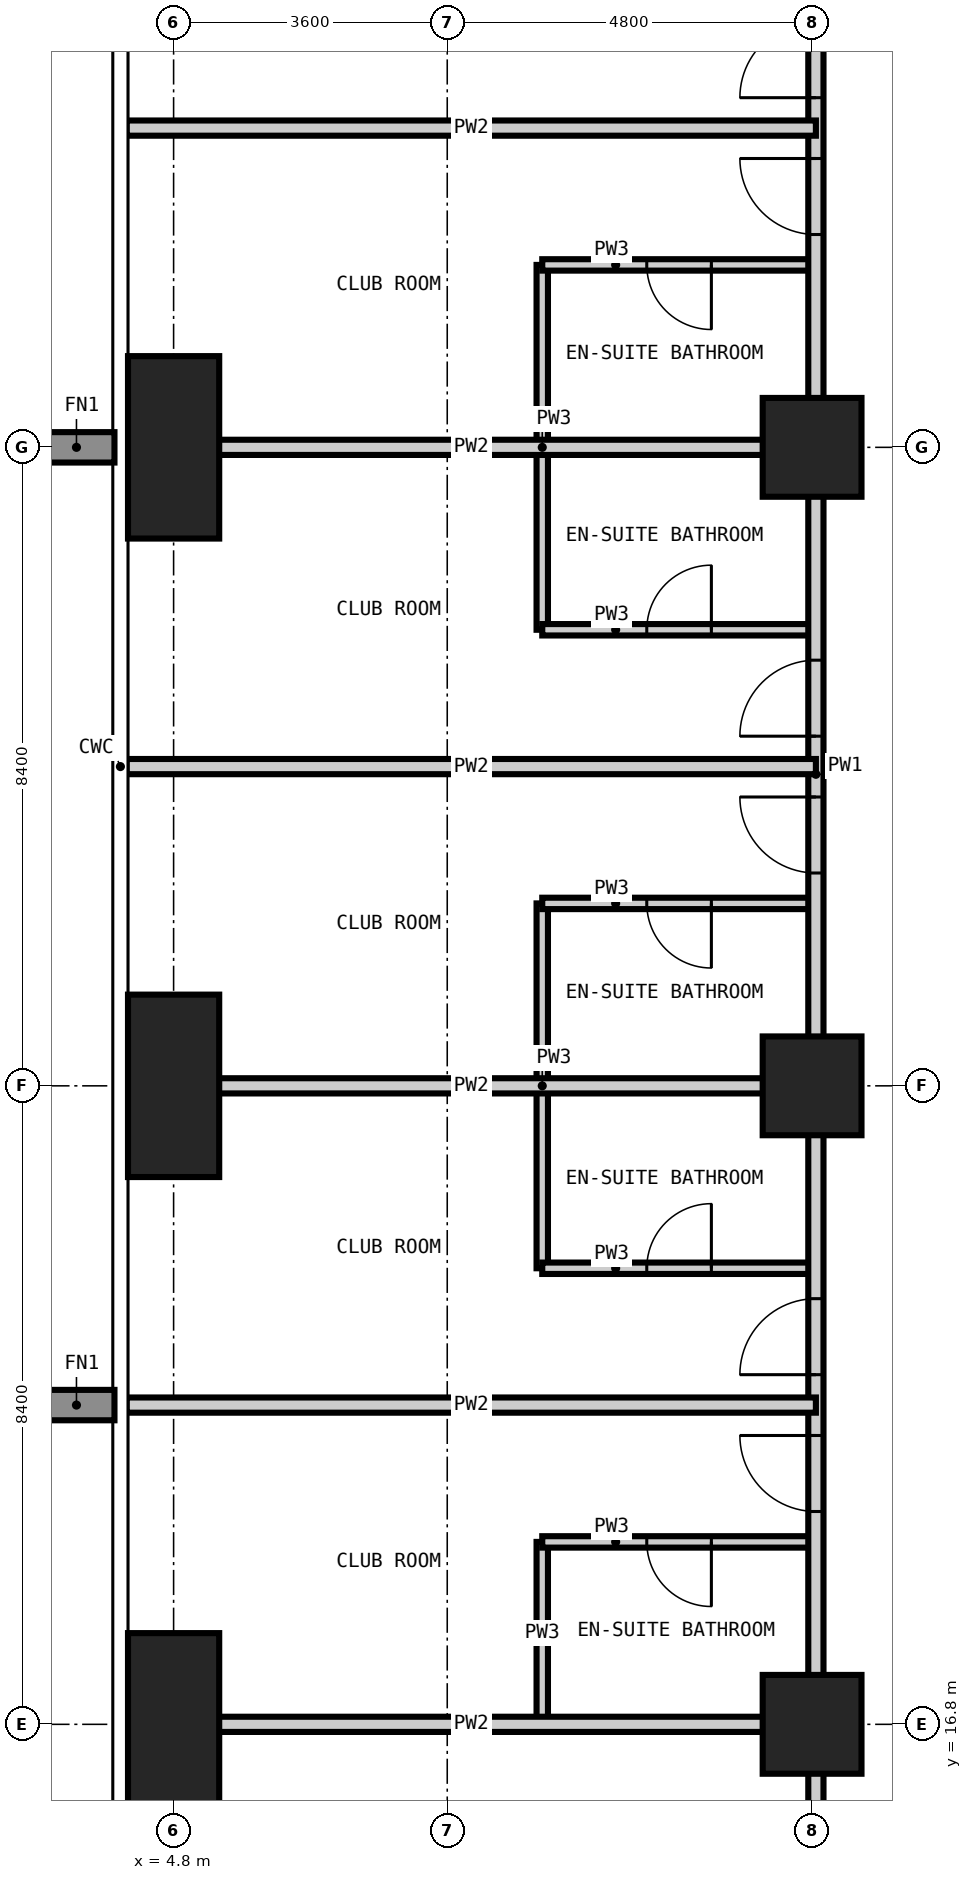
"""IFC4 building model, lengths in metres.
Left out: names, types, materials, properties, quantities, classifications, styles, units other than length and angle.
Written with IfcOpenShell. Run it as: python <this file> out.ifc"""

import sys

from ifc_helpers import new_model, si_unit, direction, frame, frame_2d, origin, origin_2d, place, context, subcontext, project, spatial, rectangle, extrude, element, fill, save


model = new_model("IFC4")
c1 = context("Model", 3, precision=1e-05, world=origin(), true_north=direction((0.0, 1.0)))
c2 = subcontext(c1, "Body", "Model", "MODEL_VIEW")
j1 = project(units=[si_unit("LENGTHUNIT", "METRE"), si_unit("PLANEANGLEUNIT", "RADIAN")], contexts=[c1])
p1 = place(None, origin())
s1 = spatial("IfcSite", under=j1, at=p1, CompositionType="ELEMENT")
p2 = place(p1, origin())
s2 = spatial("IfcBuilding", under=s1, at=p2, CompositionType="ELEMENT")
p3 = place(p2, frame((0.0, 0.0, 166.2)))
s3 = spatial("IfcBuildingStorey", under=s2, at=p3, CompositionType="ELEMENT", Elevation=166.2)
for number, where, z_axis, x_axis in (
    (1, (4.8, 16.8, -0.35), (0.0, 0.0, 1.0), (1.0, 0.0, 0.0)),
    (2, (4.8, 25.2, -0.35), (0.0, 0.0, 1.0), (1.0, 0.0, 0.0)),
    (3, (4.8, 33.6, -0.35), (0.0, 0.0, 1.0), (1.0, 0.0, 0.0)),
):
    element("IfcColumn", number, at=place(p3, frame(where, z_axis=z_axis, x_axis=x_axis)), inside=s3, PredefinedType="COLUMN", context=c2, shape_type="SweptSolid", body=[
        extrude(rectangle(XDim=1.2, YDim=2.4, at=origin_2d()), origin(), (0.0, 0.0, 1.0), 3.6),
    ])
for number, where, z_axis, x_axis in (
    (4, (13.2, 16.8, -0.35), (0.0, 0.0, 1.0), (1.0, 0.0, 0.0)),
    (5, (13.2, 25.2, -0.35), (0.0, 0.0, 1.0), (1.0, 0.0, 0.0)),
    (6, (13.2, 33.6, -0.35), (0.0, 0.0, 1.0), (1.0, 0.0, 0.0)),
):
    element("IfcColumn", number, at=place(p3, frame(where, z_axis=z_axis, x_axis=x_axis)), inside=s3, PredefinedType="COLUMN", context=c2, shape_type="SweptSolid", body=[
        extrude(rectangle(XDim=1.3, YDim=1.3, at=origin_2d()), origin(), (0.0, 0.0, 1.0), 3.6),
    ])
p4 = place(p3, frame((9.65, 16.8, 0.0), z_axis=(0.0, 0.0, 1.0), x_axis=(0.0, 1.0, 0.0)))
e7 = element("IfcWall", 7, at=p4, inside=s3, PredefinedType="PARTITIONING", context=c2, shape_type="SweptSolid", body=[
    extrude(rectangle(XDim=2.4, YDim=0.15, at=frame_2d((1.2, 0.0))), origin(), (0.0, 0.0, 1.0), 3.25),
])
for number, where, z_axis, x_axis in (
    (8, (9.65, 22.8, 0.0), (0.0, 0.0, 1.0), (0.0, 1.0, 0.0)),
    (9, (9.65, 31.2, 0.0), (0.0, 0.0, 1.0), (0.0, 1.0, 0.0)),
):
    element("IfcWall", number, at=place(p3, frame(where, z_axis=z_axis, x_axis=x_axis)), inside=s3, PredefinedType="PARTITIONING", context=c2, shape_type="SweptSolid", body=[
        extrude(rectangle(XDim=4.8, YDim=0.15, at=frame_2d((2.4, 0.0))), origin(), (0.0, 0.0, 1.0), 3.25),
    ])
p5 = place(p3, frame((9.65, 19.2, 0.0), z_axis=(0.0, 0.0, 1.0), x_axis=(1.0, 0.0, 0.0)))
e10 = element("IfcWall", 10, at=p5, inside=s3, PredefinedType="PARTITIONING", context=c2, shape_type="SweptSolid", body=[
    extrude(rectangle(XDim=3.6, YDim=0.15, at=frame_2d((1.8, 0.0))), origin(), (0.0, 0.0, 1.0), 3.25),
])
p6 = place(p5, frame((1.375, 0.0, 0.0)))
e11 = element("IfcOpeningElement", 11, at=p6, cuts=e10, PredefinedType="OPENING", context=c2, shape_type="SweptSolid", body=[
    extrude(rectangle(XDim=0.85, YDim=2.1, at=frame_2d((0.425, 1.05))), frame((0.0, 0.085, 0.0), z_axis=(0.0, -1.0, 0.0), x_axis=(1.0, 0.0, 0.0)), (0.0, 0.0, 1.0), 0.17),
])
p7 = place(p3, frame((9.65, 22.8, 0.0), z_axis=(0.0, 0.0, 1.0), x_axis=(1.0, 0.0, 0.0)))
e12 = element("IfcWall", 12, at=p7, inside=s3, PredefinedType="PARTITIONING", context=c2, shape_type="SweptSolid", body=[
    extrude(rectangle(XDim=3.6, YDim=0.15, at=frame_2d((1.8, 0.0))), origin(), (0.0, 0.0, 1.0), 3.25),
])
p8 = place(p7, frame((1.375, 0.0, 0.0)))
e13 = element("IfcOpeningElement", 13, at=p8, cuts=e12, PredefinedType="OPENING", context=c2, shape_type="SweptSolid", body=[
    extrude(rectangle(XDim=0.85, YDim=2.1, at=frame_2d((0.425, 1.05))), frame((0.0, 0.085, 0.0), z_axis=(0.0, -1.0, 0.0), x_axis=(1.0, 0.0, 0.0)), (0.0, 0.0, 1.0), 0.17),
])
p9 = place(p3, frame((9.65, 27.6, 0.0), z_axis=(0.0, 0.0, 1.0), x_axis=(1.0, 0.0, 0.0)))
e14 = element("IfcWall", 14, at=p9, inside=s3, PredefinedType="PARTITIONING", context=c2, shape_type="SweptSolid", body=[
    extrude(rectangle(XDim=3.6, YDim=0.15, at=frame_2d((1.8, 0.0))), origin(), (0.0, 0.0, 1.0), 3.25),
])
p10 = place(p9, frame((1.375, 0.0, 0.0)))
e15 = element("IfcOpeningElement", 15, at=p10, cuts=e14, PredefinedType="OPENING", context=c2, shape_type="SweptSolid", body=[
    extrude(rectangle(XDim=0.85, YDim=2.1, at=frame_2d((0.425, 1.05))), frame((0.0, 0.085, 0.0), z_axis=(0.0, -1.0, 0.0), x_axis=(1.0, 0.0, 0.0)), (0.0, 0.0, 1.0), 0.17),
])
p11 = place(p3, frame((9.65, 31.2, 0.0), z_axis=(0.0, 0.0, 1.0), x_axis=(1.0, 0.0, 0.0)))
e16 = element("IfcWall", 16, at=p11, inside=s3, PredefinedType="PARTITIONING", context=c2, shape_type="SweptSolid", body=[
    extrude(rectangle(XDim=3.6, YDim=0.15, at=frame_2d((1.8, 0.0))), origin(), (0.0, 0.0, 1.0), 3.25),
])
p12 = place(p11, frame((1.375, 0.0, 0.0)))
e17 = element("IfcOpeningElement", 17, at=p12, cuts=e16, PredefinedType="OPENING", context=c2, shape_type="SweptSolid", body=[
    extrude(rectangle(XDim=0.85, YDim=2.1, at=frame_2d((0.425, 1.05))), frame((0.0, 0.085, 0.0), z_axis=(0.0, -1.0, 0.0), x_axis=(1.0, 0.0, 0.0)), (0.0, 0.0, 1.0), 0.17),
])
p13 = place(p3, frame((9.65, 36.0, 0.0), z_axis=(0.0, 0.0, 1.0), x_axis=(1.0, 0.0, 0.0)))
e18 = element("IfcWall", 18, at=p13, inside=s3, PredefinedType="PARTITIONING", context=c2, shape_type="SweptSolid", body=[
    extrude(rectangle(XDim=3.6, YDim=0.15, at=frame_2d((1.8, 0.0))), origin(), (0.0, 0.0, 1.0), 3.25),
])
p14 = place(p13, frame((1.375, 0.0, 0.0)))
e19 = element("IfcOpeningElement", 19, at=p14, cuts=e18, PredefinedType="OPENING", context=c2, shape_type="SweptSolid", body=[
    extrude(rectangle(XDim=0.85, YDim=2.1, at=frame_2d((0.425, 1.05))), frame((0.0, 0.085, 0.0), z_axis=(0.0, -1.0, 0.0), x_axis=(1.0, 0.0, 0.0)), (0.0, 0.0, 1.0), 0.17),
])
p15 = place(p3, frame((13.25, 13.25, 0.0), z_axis=(0.0, 0.0, 1.0), x_axis=(0.0, 1.0, 0.0)))
e20 = element("IfcWall", 20, at=p15, inside=s3, PredefinedType="PARTITIONING", context=c2, shape_type="SweptSolid", body=[
    extrude(rectangle(XDim=31.7, YDim=0.2, at=frame_2d((15.85, 0.0))), origin(), (0.0, 0.0, 1.0), 3.25),
])
p16 = place(p15, frame((6.35, 0.0, 0.0)))
e21 = element("IfcOpeningElement", 21, at=p16, cuts=e20, PredefinedType="OPENING", context=c2, shape_type="SweptSolid", body=[
    extrude(rectangle(XDim=1.0, YDim=2.2, at=frame_2d((0.5, 1.1))), frame((0.0, 0.11, 0.0), z_axis=(0.0, -1.0, 0.0), x_axis=(1.0, 0.0, 0.0)), (0.0, 0.0, 1.0), 0.22),
])
p17 = place(p15, frame((8.15, 0.0, 0.0)))
e22 = element("IfcOpeningElement", 22, at=p17, cuts=e20, PredefinedType="OPENING", context=c2, shape_type="SweptSolid", body=[
    extrude(rectangle(XDim=1.0, YDim=2.2, at=frame_2d((0.5, 1.1))), frame((0.0, 0.11, 0.0), z_axis=(0.0, -1.0, 0.0), x_axis=(1.0, 0.0, 0.0)), (0.0, 0.0, 1.0), 0.22),
])
p18 = place(p15, frame((14.75, 0.0, 0.0)))
e23 = element("IfcOpeningElement", 23, at=p18, cuts=e20, PredefinedType="OPENING", context=c2, shape_type="SweptSolid", body=[
    extrude(rectangle(XDim=1.0, YDim=2.2, at=frame_2d((0.5, 1.1))), frame((0.0, 0.11, 0.0), z_axis=(0.0, -1.0, 0.0), x_axis=(1.0, 0.0, 0.0)), (0.0, 0.0, 1.0), 0.22),
])
p19 = place(p15, frame((16.55, 0.0, 0.0)))
e24 = element("IfcOpeningElement", 24, at=p19, cuts=e20, PredefinedType="OPENING", context=c2, shape_type="SweptSolid", body=[
    extrude(rectangle(XDim=1.0, YDim=2.2, at=frame_2d((0.5, 1.1))), frame((0.0, 0.11, 0.0), z_axis=(0.0, -1.0, 0.0), x_axis=(1.0, 0.0, 0.0)), (0.0, 0.0, 1.0), 0.22),
])
p20 = place(p15, frame((23.15, 0.0, 0.0)))
e25 = element("IfcOpeningElement", 25, at=p20, cuts=e20, PredefinedType="OPENING", context=c2, shape_type="SweptSolid", body=[
    extrude(rectangle(XDim=1.0, YDim=2.2, at=frame_2d((0.5, 1.1))), frame((0.0, 0.11, 0.0), z_axis=(0.0, -1.0, 0.0), x_axis=(1.0, 0.0, 0.0)), (0.0, 0.0, 1.0), 0.22),
])
p21 = place(p15, frame((24.95, 0.0, 0.0)))
e26 = element("IfcOpeningElement", 26, at=p21, cuts=e20, PredefinedType="OPENING", context=c2, shape_type="SweptSolid", body=[
    extrude(rectangle(XDim=1.0, YDim=2.2, at=frame_2d((0.5, 1.1))), frame((0.0, 0.11, 0.0), z_axis=(0.0, -1.0, 0.0), x_axis=(1.0, 0.0, 0.0)), (0.0, 0.0, 1.0), 0.22),
])
p22 = place(p15, frame((1.275, 0.0, 0.0)))
e27 = element("IfcOpeningElement", 27, at=p22, cuts=e20, PredefinedType="OPENING", context=c2, shape_type="SweptSolid", body=[
    extrude(rectangle(XDim=1.0, YDim=2.2, at=frame_2d((0.5, 1.1))), frame((0.0, 0.11, 0.0), z_axis=(0.0, -1.0, 0.0), x_axis=(1.0, 0.0, 0.0)), (0.0, 0.0, 1.0), 0.22),
])
p23 = place(p15, frame((29.725, 0.0, 0.0)))
e28 = element("IfcOpeningElement", 28, at=p23, cuts=e20, PredefinedType="OPENING", context=c2, shape_type="SweptSolid", body=[
    extrude(rectangle(XDim=1.0, YDim=2.2, at=frame_2d((0.5, 1.1))), frame((0.0, 0.11, 0.0), z_axis=(0.0, -1.0, 0.0), x_axis=(1.0, 0.0, 0.0)), (0.0, 0.0, 1.0), 0.22),
])
for number, where, z_axis, x_axis in (
    (29, (4.182, 16.8, 0.0), (0.0, 0.0, 1.0), (1.0, 0.0, 0.0)),
    (30, (4.182, 21.0, 0.0), (0.0, 0.0, 1.0), (1.0, 0.0, 0.0)),
    (31, (4.182, 25.2, 0.0), (0.0, 0.0, 1.0), (1.0, 0.0, 0.0)),
    (32, (4.182, 29.4, 0.0), (0.0, 0.0, 1.0), (1.0, 0.0, 0.0)),
    (33, (4.182, 33.6, 0.0), (0.0, 0.0, 1.0), (1.0, 0.0, 0.0)),
    (34, (4.182, 37.8, 0.0), (0.0, 0.0, 1.0), (1.0, 0.0, 0.0)),
):
    element("IfcWall", number, at=place(p3, frame(where, z_axis=z_axis, x_axis=x_axis)), inside=s3, PredefinedType="PARTITIONING", context=c2, shape_type="SweptSolid", body=[
        extrude(rectangle(XDim=9.068, YDim=0.2, at=frame_2d((4.534, 0.0))), origin(), (0.0, 0.0, 1.0), 3.25),
    ])
p24 = place(p16, origin())
e35 = element("IfcDoor", 35, at=p24, inside=s3, OperationType="SINGLE_SWING_RIGHT", PredefinedType="DOOR", context=c2, shape_type="SweptSolid", body=[
    extrude(rectangle(XDim=1.0, YDim=2.2, at=frame_2d((0.5, 1.1))), frame((0.0, 0.025, 0.0), z_axis=(0.0, -1.0, 0.0), x_axis=(1.0, 0.0, 0.0)), (0.0, 0.0, 1.0), 0.05),
])
fill(e21, e35)
p25 = place(p6, frame((0.85, 0.0, 0.0), z_axis=(0.0, 0.0, 1.0), x_axis=(-1.0, 0.0, 0.0)))
e36 = element("IfcDoor", 36, at=p25, inside=s3, OperationType="SINGLE_SWING_LEFT", PredefinedType="DOOR", context=c2, shape_type="SweptSolid", body=[
    extrude(rectangle(XDim=0.85, YDim=2.1, at=frame_2d((0.425, 1.05))), frame((0.0, 0.025, 0.0), z_axis=(0.0, -1.0, 0.0), x_axis=(1.0, 0.0, 0.0)), (0.0, 0.0, 1.0), 0.05),
])
fill(e11, e36)
p26 = place(p17, origin())
e37 = element("IfcDoor", 37, at=p26, inside=s3, OperationType="SINGLE_SWING_LEFT", PredefinedType="DOOR", context=c2, shape_type="SweptSolid", body=[
    extrude(rectangle(XDim=1.0, YDim=2.2, at=frame_2d((0.5, 1.1))), frame((0.0, 0.025, 0.0), z_axis=(0.0, -1.0, 0.0), x_axis=(1.0, 0.0, 0.0)), (0.0, 0.0, 1.0), 0.05),
])
fill(e22, e37)
p27 = place(p8, origin())
e38 = element("IfcDoor", 38, at=p27, inside=s3, OperationType="SINGLE_SWING_RIGHT", PredefinedType="DOOR", context=c2, shape_type="SweptSolid", body=[
    extrude(rectangle(XDim=0.85, YDim=2.1, at=frame_2d((0.425, 1.05))), frame((0.0, 0.025, 0.0), z_axis=(0.0, -1.0, 0.0), x_axis=(1.0, 0.0, 0.0)), (0.0, 0.0, 1.0), 0.05),
])
fill(e13, e38)
p28 = place(p18, origin())
e39 = element("IfcDoor", 39, at=p28, inside=s3, OperationType="SINGLE_SWING_RIGHT", PredefinedType="DOOR", context=c2, shape_type="SweptSolid", body=[
    extrude(rectangle(XDim=1.0, YDim=2.2, at=frame_2d((0.5, 1.1))), frame((0.0, 0.025, 0.0), z_axis=(0.0, -1.0, 0.0), x_axis=(1.0, 0.0, 0.0)), (0.0, 0.0, 1.0), 0.05),
])
fill(e23, e39)
p29 = place(p10, frame((0.85, 0.0, 0.0), z_axis=(0.0, 0.0, 1.0), x_axis=(-1.0, 0.0, 0.0)))
e40 = element("IfcDoor", 40, at=p29, inside=s3, OperationType="SINGLE_SWING_LEFT", PredefinedType="DOOR", context=c2, shape_type="SweptSolid", body=[
    extrude(rectangle(XDim=0.85, YDim=2.1, at=frame_2d((0.425, 1.05))), frame((0.0, 0.025, 0.0), z_axis=(0.0, -1.0, 0.0), x_axis=(1.0, 0.0, 0.0)), (0.0, 0.0, 1.0), 0.05),
])
fill(e15, e40)
p30 = place(p19, origin())
e41 = element("IfcDoor", 41, at=p30, inside=s3, OperationType="SINGLE_SWING_LEFT", PredefinedType="DOOR", context=c2, shape_type="SweptSolid", body=[
    extrude(rectangle(XDim=1.0, YDim=2.2, at=frame_2d((0.5, 1.1))), frame((0.0, 0.025, 0.0), z_axis=(0.0, -1.0, 0.0), x_axis=(1.0, 0.0, 0.0)), (0.0, 0.0, 1.0), 0.05),
])
fill(e24, e41)
p31 = place(p12, origin())
e42 = element("IfcDoor", 42, at=p31, inside=s3, OperationType="SINGLE_SWING_RIGHT", PredefinedType="DOOR", context=c2, shape_type="SweptSolid", body=[
    extrude(rectangle(XDim=0.85, YDim=2.1, at=frame_2d((0.425, 1.05))), frame((0.0, 0.025, 0.0), z_axis=(0.0, -1.0, 0.0), x_axis=(1.0, 0.0, 0.0)), (0.0, 0.0, 1.0), 0.05),
])
fill(e17, e42)
p32 = place(p20, origin())
e43 = element("IfcDoor", 43, at=p32, inside=s3, OperationType="SINGLE_SWING_RIGHT", PredefinedType="DOOR", context=c2, shape_type="SweptSolid", body=[
    extrude(rectangle(XDim=1.0, YDim=2.2, at=frame_2d((0.5, 1.1))), frame((0.0, 0.025, 0.0), z_axis=(0.0, -1.0, 0.0), x_axis=(1.0, 0.0, 0.0)), (0.0, 0.0, 1.0), 0.05),
])
fill(e25, e43)
p33 = place(p14, frame((0.85, 0.0, 0.0), z_axis=(0.0, 0.0, 1.0), x_axis=(-1.0, 0.0, 0.0)))
e44 = element("IfcDoor", 44, at=p33, inside=s3, OperationType="SINGLE_SWING_LEFT", PredefinedType="DOOR", context=c2, shape_type="SweptSolid", body=[
    extrude(rectangle(XDim=0.85, YDim=2.1, at=frame_2d((0.425, 1.05))), frame((0.0, 0.025, 0.0), z_axis=(0.0, -1.0, 0.0), x_axis=(1.0, 0.0, 0.0)), (0.0, 0.0, 1.0), 0.05),
])
fill(e19, e44)
p34 = place(p21, origin())
e45 = element("IfcDoor", 45, at=p34, inside=s3, OperationType="SINGLE_SWING_LEFT", PredefinedType="DOOR", context=c2, shape_type="SweptSolid", body=[
    extrude(rectangle(XDim=1.0, YDim=2.2, at=frame_2d((0.5, 1.1))), frame((0.0, 0.025, 0.0), z_axis=(0.0, -1.0, 0.0), x_axis=(1.0, 0.0, 0.0)), (0.0, 0.0, 1.0), 0.05),
])
fill(e26, e45)
save(model, sys.argv[1])
